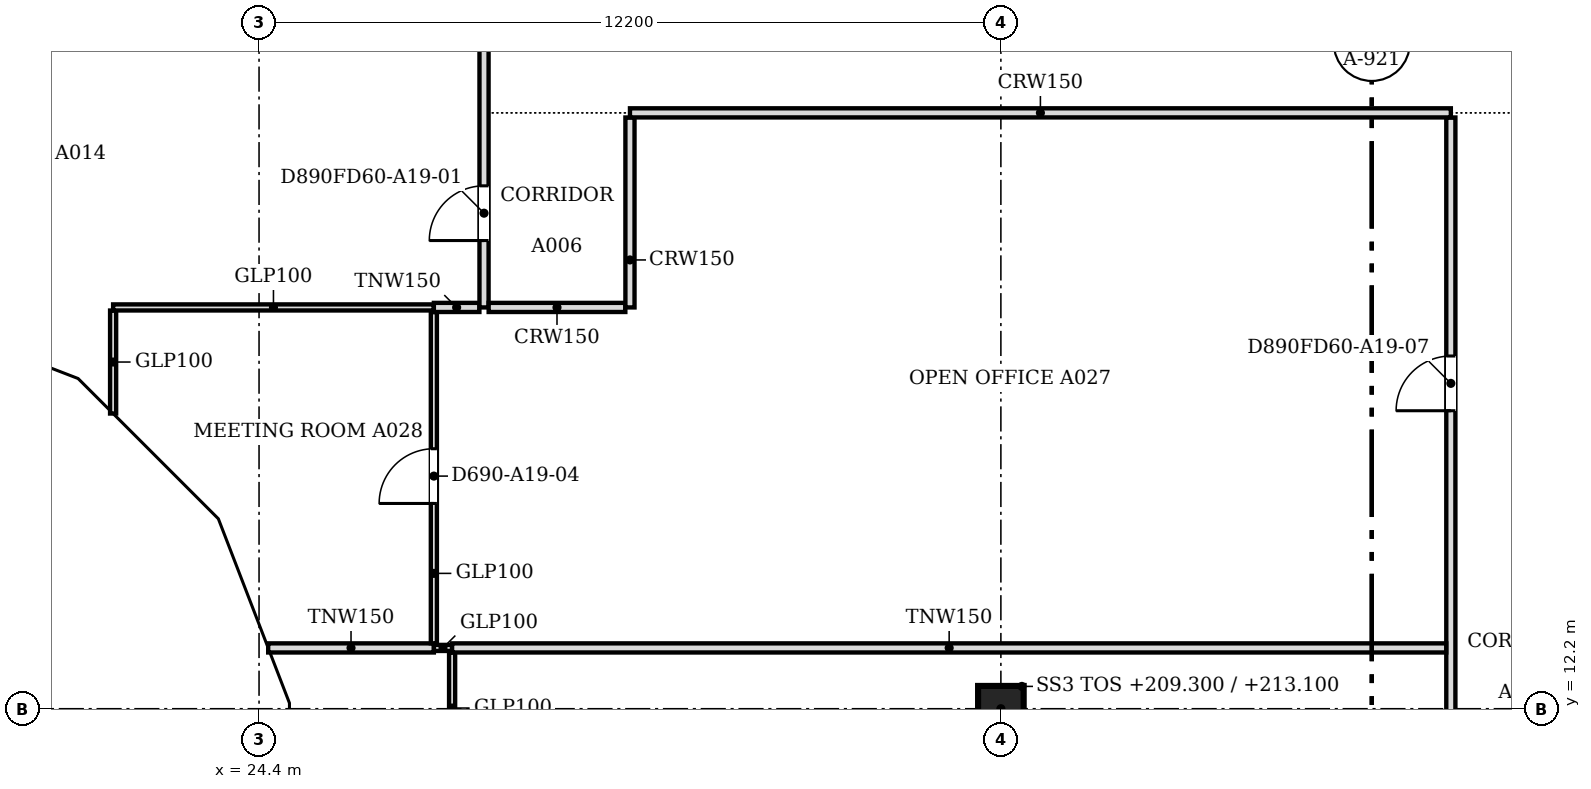
"""IFC4 building model, lengths in metres.
Left out: names, types, materials, properties, quantities, classifications, styles, units other than length and angle.
Written with IfcOpenShell. Run it as: python <this file> out.ifc"""

import sys

from ifc_helpers import new_model, si_unit, direction, frame, frame_2d, origin, origin_2d, place, context, subcontext, project, spatial, polyline, rectangle, outline, extrude, faceted_brep, source, transform, mapped, element, fill, save


model = new_model("IFC4")
c1 = context("Model", 3, precision=1e-05, world=origin(), true_north=direction((0.0, 1.0)))
c2 = subcontext(c1, "Body", "Model", "MODEL_VIEW")
j1 = project(units=[si_unit("LENGTHUNIT", "METRE"), si_unit("PLANEANGLEUNIT", "RADIAN")], contexts=[c1])
p1 = place(None, origin())
s1 = spatial("IfcSite", under=j1, at=p1, CompositionType="ELEMENT")
p2 = place(p1, origin())
s2 = spatial("IfcBuilding", under=s1, at=p2, CompositionType="ELEMENT")
p3 = place(p2, frame((0.0, 0.0, 209.3)))
s3 = spatial("IfcBuildingStorey", under=s2, at=p3, CompositionType="ELEMENT", Elevation=209.3)
p4 = place(p3, frame((36.6, 12.2, 0.0), z_axis=(0.0, 0.0, 1.0), x_axis=(1.0, 0.0, 0.0)))
e1 = element("IfcColumn", 1, at=p4, inside=s3, PredefinedType="COLUMN", context=c2, shape_type="SweptSolid", body=[
    extrude(rectangle(XDim=0.75, YDim=0.75, at=origin_2d()), origin(), (0.0, 0.0, 1.0), 3.6),
])
m1 = source(origin(), c2, "Body", "Brep", [
    faceted_brep([(3.096, -0.25, 7.536), (0.047, -0.25, 3.856), (0.047, -0.25, 3.744), (3.096, -0.25, 0.064), (0.0, 0.25, 3.8), (3.149, 0.25, 7.6), (3.202, 0.25, 7.536), (3.202, 0.25, 0.064), (3.149, 0.25, 0.0), (3.149, -0.0, 0.0), (3.149, -0.0, 7.6), (0.0, 0.0, 3.8)], [[[0, 1, 2, 3]], [[4, 5, 6, 7, 8]], [[8, 7, 9]], [[6, 5, 10]], [[5, 4, 11, 1, 0, 10]], [[4, 8, 9, 3, 2, 11]], [[11, 2, 1]], [[3, 9, 7, 6, 10, 0]]]),
])
p5 = place(p3, frame((18.346, 18.55, -3.8), z_axis=(0.0, 0.0, 1.0), x_axis=(0.932985567668, -0.359913782069, 0.0)))
e2 = element("IfcWall", 2, at=p5, inside=s3, PredefinedType="SOLIDWALL", context=c2, shape_type="MappedRepresentation", body=[
    mapped(m1, transform((0.0, 0.0, 0.0), scale=1.0)),
])
m2 = source(origin(), c2, "Body", "SweptSolid", [
    extrude(outline(polyline([(2.949, 6.967), (0.325, 3.8), (2.949, 0.633), (2.949, 6.967)])), frame((0.0, 0.26, 0.0), z_axis=(0.0, -1.0, 0.0), x_axis=(1.0, 0.0, 0.0)), (0.0, 0.0, 1.0), 0.52),
])
p6 = place(p5, origin())
e3 = element("IfcOpeningElement", 3, at=p6, cuts=e2, PredefinedType="OPENING", context=c2, shape_type="MappedRepresentation", body=[
    mapped(m2, transform((0.0, 0.0, 0.0), scale=1.0)),
])
m3 = source(origin(), c2, "Body", "Brep", [
    faceted_brep([(0.106, -0.25, 0.064), (3.156, -0.25, 3.736), (3.156, -0.25, 3.864), (0.106, -0.25, 7.536), (0.0, 0.25, 7.536), (0.053, 0.25, 7.6), (3.209, 0.25, 3.8), (0.053, 0.25, 0.0), (0.0, 0.25, 0.064), (3.209, -0.0, 3.8), (0.053, 0.0, 0.0), (0.053, 0.0, 7.6)], [[[0, 1, 2, 3]], [[4, 5, 6, 7, 8]], [[7, 6, 9, 1, 0, 10]], [[6, 5, 11, 3, 2, 9]], [[5, 4, 11]], [[8, 7, 10]], [[8, 10, 0, 3, 11, 4]], [[1, 9, 2]]]),
])
p7 = place(p3, frame((21.248, 17.454, -3.8), z_axis=(0.0, 0.0, 1.0), x_axis=(0.707106781187, -0.707106781187, 0.0)))
e4 = element("IfcWall", 4, at=p7, inside=s3, PredefinedType="SOLIDWALL", context=c2, shape_type="MappedRepresentation", body=[
    mapped(m3, transform((0.0, 0.0, 0.0), scale=1.0)),
])
m4 = source(origin(), c2, "Body", "SweptSolid", [
    extrude(outline(polyline([(0.253, 0.632), (2.884, 3.8), (0.253, 6.968), (0.253, 0.632)])), frame((0.0, 0.26, 0.0), z_axis=(0.0, -1.0, 0.0), x_axis=(1.0, 0.0, 0.0)), (0.0, 0.0, 1.0), 0.52),
])
p8 = place(p7, origin())
e5 = element("IfcOpeningElement", 5, at=p8, cuts=e4, PredefinedType="OPENING", context=c2, shape_type="MappedRepresentation", body=[
    mapped(m4, transform((0.0, 0.0, 0.0), scale=1.0)),
])
m5 = source(origin(), c2, "Body", "Brep", [
    faceted_brep([(3.103, -0.25, 7.544), (0.053, -0.25, 3.864), (0.053, -0.25, 3.736), (3.103, -0.25, 0.056), (0.0, 0.25, 3.8), (3.149, 0.25, 7.6), (3.196, 0.25, 7.543), (3.196, 0.25, 0.057), (3.149, 0.25, 0.0), (3.149, -0.0, 0.0), (3.149, -0.0, 7.6), (0.0, 0.0, 3.8)], [[[0, 1, 2, 3]], [[4, 5, 6, 7, 8]], [[8, 7, 9]], [[6, 5, 10]], [[5, 4, 11, 1, 0, 10]], [[4, 8, 9, 3, 2, 11]], [[11, 2, 1]], [[3, 9, 7, 6, 10, 0]]]),
])
p9 = place(p3, frame((23.517, 15.185, -3.8), z_axis=(0.0, 0.0, 1.0), x_axis=(0.359864468756, -0.933004589553, 0.0)))
e6 = element("IfcWall", 6, at=p9, inside=s3, PredefinedType="SOLIDWALL", context=c2, shape_type="MappedRepresentation", body=[
    mapped(m5, transform((0.0, 0.0, 0.0), scale=1.0)),
])
p10 = place(p9, origin())
e7 = element("IfcOpeningElement", 7, at=p10, cuts=e6, PredefinedType="OPENING", context=c2, shape_type="MappedRepresentation", body=[
    mapped(m2, transform((0.0, 0.0, 0.0), scale=1.0)),
])
m6 = source(origin(), c2, "Body", "Brep", [
    faceted_brep([(0.093, -0.25, 0.057), (3.143, -0.25, 3.8), (0.093, -0.25, 7.543), (0.0, 0.25, 7.544), (0.047, 0.25, 7.6), (3.143, 0.25, 3.8), (0.047, 0.25, 0.0), (0.0, 0.25, 0.056), (0.047, 0.0, 0.0), (0.047, 0.0, 7.6)], [[[0, 1, 2]], [[3, 4, 5, 6, 7]], [[6, 5, 1, 0, 8]], [[5, 4, 9, 2, 1]], [[4, 3, 9]], [[7, 6, 8]], [[7, 8, 0, 2, 9, 3]]]),
])
p11 = place(p3, frame((24.65, 12.293, -3.8), z_axis=(0.0, 0.0, 1.0), x_axis=(0.0, -1.0, 0.0)))
e8 = element("IfcWall", 8, at=p11, inside=s3, PredefinedType="SOLIDWALL", context=c2, shape_type="MappedRepresentation", body=[
    mapped(m6, transform((0.0, 0.0, 0.0), scale=1.0)),
])
m7 = source(origin(), c2, "Body", "SweptSolid", [
    extrude(outline(polyline([(0.247, 0.641), (2.821, 3.8), (0.247, 6.959), (0.247, 0.641)])), frame((0.0, 0.26, 0.0), z_axis=(0.0, -1.0, 0.0), x_axis=(1.0, 0.0, 0.0)), (0.0, 0.0, 1.0), 0.52),
])
p12 = place(p11, origin())
e9 = element("IfcOpeningElement", 9, at=p12, cuts=e8, PredefinedType="OPENING", context=c2, shape_type="MappedRepresentation", body=[
    mapped(m7, transform((0.0, 0.0, 0.0), scale=1.0)),
])
p13 = place(p2, frame((0.0, 0.0, 213.1)))
s4 = spatial("IfcBuildingStorey", under=s2, at=p13, CompositionType="ELEMENT", Elevation=213.1)
m8 = source(origin(), c2, "Body", "Brep", [
    faceted_brep([(0.093, -0.25, 0.056), (3.143, -0.25, 3.736), (3.143, -0.25, 3.864), (0.093, -0.25, 7.544), (0.0, 0.25, 7.543), (0.047, 0.25, 7.6), (3.196, 0.25, 3.8), (0.047, 0.25, 0.0), (0.0, 0.25, 0.057), (3.196, -0.0, 3.8), (0.047, 0.0, 0.0), (0.047, 0.0, 7.6)], [[[0, 1, 2, 3]], [[4, 5, 6, 7, 8]], [[7, 6, 9, 1, 0, 10]], [[6, 5, 11, 3, 2, 9]], [[5, 4, 11]], [[8, 7, 10]], [[8, 10, 0, 3, 11, 4]], [[1, 9, 2]]]),
])
p14 = place(p13, frame((18.303, 18.567, -3.8), z_axis=(0.0, 0.0, 1.0), x_axis=(0.932978940178, -0.359930961693, 0.0)))
e10 = element("IfcWall", 10, at=p14, inside=s4, PredefinedType="SOLIDWALL", context=c2, shape_type="MappedRepresentation", body=[
    mapped(m8, transform((0.0, 0.0, 0.0), scale=1.0)),
])
m9 = source(origin(), c2, "Body", "SweptSolid", [
    extrude(outline(polyline([(0.247, 0.633), (2.871, 3.8), (0.247, 6.967), (0.247, 0.633)])), frame((0.0, 0.26, 0.0), z_axis=(0.0, -1.0, 0.0), x_axis=(1.0, 0.0, 0.0)), (0.0, 0.0, 1.0), 0.52),
])
p15 = place(p14, origin())
e11 = element("IfcOpeningElement", 11, at=p15, cuts=e10, PredefinedType="OPENING", context=c2, shape_type="MappedRepresentation", body=[
    mapped(m9, transform((0.0, 0.0, 0.0), scale=1.0)),
])
m10 = source(origin(), c2, "Body", "Brep", [
    faceted_brep([(3.103, -0.25, 7.536), (0.053, -0.25, 3.864), (0.053, -0.25, 3.736), (3.103, -0.25, 0.064), (0.0, 0.25, 3.8), (3.156, 0.25, 7.6), (3.209, 0.25, 7.536), (3.209, 0.25, 0.064), (3.156, 0.25, 0.0), (3.156, -0.0, 0.0), (3.156, -0.0, 7.6), (0.0, 0.0, 3.8)], [[[0, 1, 2, 3]], [[4, 5, 6, 7, 8]], [[8, 7, 9]], [[6, 5, 10]], [[5, 4, 11, 1, 0, 10]], [[4, 8, 9, 3, 2, 11]], [[2, 1, 11]], [[3, 9, 7, 6, 10, 0]]]),
])
p16 = place(p13, frame((21.285, 17.417, -3.8), z_axis=(0.0, 0.0, 1.0), x_axis=(0.707106781187, -0.707106781187, 0.0)))
e12 = element("IfcWall", 12, at=p16, inside=s4, PredefinedType="SOLIDWALL", context=c2, shape_type="MappedRepresentation", body=[
    mapped(m10, transform((0.0, 0.0, 0.0), scale=1.0)),
])
m11 = source(origin(), c2, "Body", "SweptSolid", [
    extrude(outline(polyline([(2.956, 6.968), (0.325, 3.8), (2.956, 0.632), (2.956, 6.968)])), frame((0.0, 0.26, 0.0), z_axis=(0.0, -1.0, 0.0), x_axis=(1.0, 0.0, 0.0)), (0.0, 0.0, 1.0), 0.52),
])
p17 = place(p16, origin())
e13 = element("IfcOpeningElement", 13, at=p17, cuts=e12, PredefinedType="OPENING", context=c2, shape_type="MappedRepresentation", body=[
    mapped(m11, transform((0.0, 0.0, 0.0), scale=1.0)),
])
m12 = source(origin(), c2, "Body", "Brep", [
    faceted_brep([(0.106, -0.25, 0.064), (3.156, -0.25, 3.744), (3.156, -0.25, 3.856), (0.106, -0.25, 7.536), (0.0, 0.25, 7.536), (0.053, 0.25, 7.6), (3.202, 0.25, 3.8), (0.053, 0.25, 0.0), (0.0, 0.25, 0.064), (3.202, -0.0, 3.8), (0.053, 0.0, 0.0), (0.053, 0.0, 7.6)], [[[0, 1, 2, 3]], [[4, 5, 6, 7, 8]], [[7, 6, 9, 1, 0, 10]], [[6, 5, 11, 3, 2, 9]], [[5, 4, 11]], [[8, 7, 10]], [[8, 10, 0, 3, 11, 4]], [[1, 9, 2]]]),
])
p18 = place(p13, frame((23.497, 15.234, -3.8), z_axis=(0.0, 0.0, 1.0), x_axis=(0.359913782069, -0.932985567668, 0.0)))
e14 = element("IfcWall", 14, at=p18, inside=s4, PredefinedType="SOLIDWALL", context=c2, shape_type="MappedRepresentation", body=[
    mapped(m12, transform((0.0, 0.0, 0.0), scale=1.0)),
])
m13 = source(origin(), c2, "Body", "SweptSolid", [
    extrude(outline(polyline([(0.253, 0.633), (2.878, 3.8), (0.253, 6.967), (0.253, 0.633)])), frame((0.0, 0.26, 0.0), z_axis=(0.0, -1.0, 0.0), x_axis=(1.0, 0.0, 0.0)), (0.0, 0.0, 1.0), 0.52),
])
p19 = place(p18, origin())
e15 = element("IfcOpeningElement", 15, at=p19, cuts=e14, PredefinedType="OPENING", context=c2, shape_type="MappedRepresentation", body=[
    mapped(m13, transform((0.0, 0.0, 0.0), scale=1.0)),
])
m14 = source(origin(), c2, "Body", "Brep", [
    faceted_brep([(3.096, -0.25, 0.0), (6.1, -0.25, 3.8), (3.096, -0.25, 7.6), (0.047, -0.25, 3.857), (0.047, -0.25, 3.743), (0.0, 0.25, 3.8), (3.096, 0.25, 7.6), (6.053, 0.25, 3.859), (6.053, 0.25, 3.741), (3.096, 0.25, 0.0), (6.1, -0.0, 3.8), (0.0, 0.0, 3.8)], [[[0, 1, 2, 3, 4]], [[5, 6, 7, 8, 9]], [[9, 8, 10, 1, 0]], [[7, 6, 2, 1, 10]], [[6, 5, 11, 3, 2]], [[5, 9, 0, 4, 11]], [[4, 3, 11]], [[8, 7, 10]]]),
])
p20 = place(p13, frame((24.65, 12.247, -3.8), z_axis=(0.0, 0.0, 1.0), x_axis=(0.0, -1.0, 0.0)))
e16 = element("IfcWall", 16, at=p20, inside=s4, PredefinedType="SOLIDWALL", context=c2, shape_type="MappedRepresentation", body=[
    mapped(m14, transform((0.0, 0.0, 0.0), scale=1.0)),
])
m15 = source(origin(), c2, "Body", "SweptSolid", [
    extrude(outline(polyline([(3.094, 0.399), (5.781, 3.8), (3.094, 7.2), (0.323, 3.8), (3.094, 0.399)])), frame((0.0, 0.26, 0.0), z_axis=(0.0, -1.0, 0.0), x_axis=(1.0, 0.0, 0.0)), (0.0, 0.0, 1.0), 0.52),
])
p21 = place(p20, origin())
e17 = element("IfcOpeningElement", 17, at=p21, cuts=e16, PredefinedType="OPENING", context=c2, shape_type="MappedRepresentation", body=[
    mapped(m15, transform((0.0, 0.0, 0.0), scale=1.0)),
])
p22 = place(p3, frame((44.0, 0.5, 0.0), z_axis=(0.0, 0.0, 1.0), x_axis=(0.0, 1.0, 0.0)))
e18 = element("IfcWall", 18, at=p22, inside=s3, PredefinedType="PARTITIONING", context=c2, shape_type="SweptSolid", body=[
    extrude(rectangle(XDim=21.424, YDim=0.15, at=frame_2d((10.712, 0.0))), origin(), (0.0, 0.0, 1.0), 3.067),
])
m16 = source(origin(), c2, "Body", "SweptSolid", [
    extrude(rectangle(XDim=0.9, YDim=2.1, at=frame_2d((0.45, 1.05))), frame((0.0, 0.085, 0.0), z_axis=(0.0, -1.0, 0.0), x_axis=(1.0, 0.0, 0.0)), (0.0, 0.0, 1.0), 0.17),
])
p23 = place(p22, frame((16.601, 0.0, 0.0)))
e19 = element("IfcOpeningElement", 19, at=p23, cuts=e18, PredefinedType="OPENING", context=c2, shape_type="MappedRepresentation", body=[
    mapped(m16, transform((0.0, 0.0, 0.0), scale=1.0)),
])
p24 = place(p22, frame((7.7, 0.0, 0.0)))
e20 = element("IfcOpeningElement", 20, at=p24, cuts=e18, PredefinedType="OPENING", context=c2, shape_type="MappedRepresentation", body=[
    mapped(m16, transform((0.0, 0.0, 0.0), scale=1.0)),
])
p25 = place(p3, frame((27.575, 8.599, 0.0), z_axis=(0.0, 0.0, 1.0), x_axis=(0.0, 1.0, 0.0)))
e21 = element("IfcWall", 21, at=p25, inside=s3, PredefinedType="PARTITIONING", context=c2, shape_type="SweptSolid", body=[
    extrude(rectangle(XDim=4.525, YDim=0.1, at=frame_2d((2.263, 0.0))), origin(), (0.0, 0.0, 1.0), 3.067),
])
m17 = source(origin(), c2, "Body", "SweptSolid", [
    extrude(rectangle(XDim=0.9, YDim=2.1, at=frame_2d((0.45, 1.05))), frame((0.0, 0.06, 0.0), z_axis=(0.0, -1.0, 0.0), x_axis=(1.0, 0.0, 0.0)), (0.0, 0.0, 1.0), 0.12),
])
p26 = place(p25, frame((1.8, 0.0, 0.0)))
e22 = element("IfcOpeningElement", 22, at=p26, cuts=e21, PredefinedType="OPENING", context=c2, shape_type="MappedRepresentation", body=[
    mapped(m17, transform((0.0, 0.0, 0.0), scale=1.0)),
])
p27 = place(p3, frame((24.55, 13.2, 0.0), z_axis=(0.0, 0.0, 1.0), x_axis=(1.0, 0.0, 0.0)))
e23 = element("IfcWall", 23, at=p27, inside=s3, PredefinedType="PARTITIONING", context=c2, shape_type="SweptSolid", body=[
    extrude(rectangle(XDim=2.725, YDim=0.15, at=frame_2d((1.362, 0.0))), origin(), (0.0, 0.0, 1.0), 3.067),
])
p28 = place(p3, frame((27.276, 13.2, 0.0), z_axis=(0.0, 0.0, 1.0), x_axis=(1.0, 0.0, 0.0)))
e24 = element("IfcWall", 24, at=p28, inside=s3, PredefinedType="PARTITIONING", context=c2, shape_type="SweptSolid", body=[
    extrude(rectangle(XDim=0.298, YDim=0.1, at=frame_2d((0.149, 0.0))), origin(), (0.0, 0.0, 1.0), 3.067),
])
p29 = place(p3, frame((27.575, 13.2, 0.0), z_axis=(0.0, 0.0, 1.0), x_axis=(1.0, 0.0, 0.0)))
e25 = element("IfcWall", 25, at=p29, inside=s3, PredefinedType="PARTITIONING", context=c2, shape_type="SweptSolid", body=[
    extrude(rectangle(XDim=16.349, YDim=0.15, at=frame_2d((8.175, 0.0))), origin(), (0.0, 0.0, 1.0), 3.067),
])
p30 = place(p3, frame((27.275, 13.276, 0.0), z_axis=(0.0, 0.0, 1.0), x_axis=(0.0, 1.0, 0.0)))
e26 = element("IfcWall", 26, at=p30, inside=s3, PredefinedType="PARTITIONING", context=c2, shape_type="SweptSolid", body=[
    extrude(rectangle(XDim=5.448, YDim=0.1, at=frame_2d((2.724, 0.0))), origin(), (0.0, 0.0, 1.0), 3.067),
])
p31 = place(p30, frame((2.3, 0.0, 0.0)))
e27 = element("IfcOpeningElement", 27, at=p31, cuts=e26, PredefinedType="OPENING", context=c2, shape_type="MappedRepresentation", body=[
    mapped(m17, transform((0.0, 0.0, 0.0), scale=1.0)),
])
p32 = place(p3, frame((22.0, 17.055, 0.0), z_axis=(0.0, 0.0, 1.0), x_axis=(0.0, 1.0, 0.0)))
e28 = element("IfcWall", 28, at=p32, inside=s3, PredefinedType="PARTITIONING", context=c2, shape_type="SweptSolid", body=[
    extrude(rectangle(XDim=1.694, YDim=0.1, at=frame_2d((0.847, 0.0))), origin(), (0.0, 0.0, 1.0), 3.067),
])
p33 = place(p3, frame((22.0, 18.8, 0.0), z_axis=(0.0, 0.0, 1.0), x_axis=(1.0, 0.0, 0.0)))
e29 = element("IfcWall", 29, at=p33, inside=s3, PredefinedType="PARTITIONING", context=c2, shape_type="SweptSolid", body=[
    extrude(rectangle(XDim=5.274, YDim=0.1, at=frame_2d((2.637, 0.0))), origin(), (0.0, 0.0, 1.0), 3.067),
])
p34 = place(p3, frame((27.275, 18.8, 0.0), z_axis=(0.0, 0.0, 1.0), x_axis=(1.0, 0.0, 0.0)))
e30 = element("IfcWall", 30, at=p34, inside=s3, PredefinedType="PARTITIONING", context=c2, shape_type="SweptSolid", body=[
    extrude(rectangle(XDim=0.749, YDim=0.15, at=frame_2d((0.375, 0.0))), origin(), (0.0, 0.0, 1.0), 3.067),
])
p35 = place(p3, frame((28.1, 18.8, 0.0), z_axis=(0.0, 0.0, 1.0), x_axis=(0.0, 1.0, 0.0)))
e31 = element("IfcWall", 31, at=p35, inside=s3, PredefinedType="PARTITIONING", context=c2, shape_type="SweptSolid", body=[
    extrude(rectangle(XDim=26.024, YDim=0.15, at=frame_2d((13.012, 0.0))), origin(), (0.0, 0.0, 1.0), 3.067),
])
p36 = place(p35, frame((1.1, 0.0, 0.0)))
e32 = element("IfcOpeningElement", 32, at=p36, cuts=e31, PredefinedType="OPENING", context=c2, shape_type="MappedRepresentation", body=[
    mapped(m16, transform((0.0, 0.0, 0.0), scale=1.0)),
])
m18 = source(origin(), c2, "Body", "SweptSolid", [
    extrude(rectangle(XDim=1.0, YDim=2.1, at=frame_2d((0.5, 1.05))), frame((0.0, 0.085, 0.0), z_axis=(0.0, -1.0, 0.0), x_axis=(1.0, 0.0, 0.0)), (0.0, 0.0, 1.0), 0.17),
])
p37 = place(p35, frame((14.201, 0.0, 0.0)))
e33 = element("IfcOpeningElement", 33, at=p37, cuts=e31, PredefinedType="OPENING", context=c2, shape_type="MappedRepresentation", body=[
    mapped(m18, transform((0.0, 0.0, 0.0), scale=1.0)),
])
p38 = place(p35, frame((8.1, 0.0, 0.0)))
e34 = element("IfcOpeningElement", 34, at=p38, cuts=e31, PredefinedType="OPENING", context=c2, shape_type="MappedRepresentation", body=[
    mapped(m18, transform((0.0, 0.0, 0.0), scale=1.0)),
])
p39 = place(p35, frame((21.5, 0.0, 0.0)))
e35 = element("IfcOpeningElement", 35, at=p39, cuts=e31, PredefinedType="OPENING", context=c2, shape_type="MappedRepresentation", body=[
    mapped(m16, transform((0.0, 0.0, 0.0), scale=1.0)),
])
p40 = place(p3, frame((28.176, 18.8, 0.0), z_axis=(0.0, 0.0, 1.0), x_axis=(1.0, 0.0, 0.0)))
e36 = element("IfcWall", 36, at=p40, inside=s3, PredefinedType="PARTITIONING", context=c2, shape_type="SweptSolid", body=[
    extrude(rectangle(XDim=2.248, YDim=0.15, at=frame_2d((1.124, 0.0))), origin(), (0.0, 0.0, 1.0), 3.067),
])
p41 = place(p3, frame((30.5, 18.8, 0.0), z_axis=(0.0, 0.0, 1.0), x_axis=(0.0, 1.0, 0.0)))
e37 = element("IfcWall", 37, at=p41, inside=s3, PredefinedType="PARTITIONING", context=c2, shape_type="SweptSolid", body=[
    extrude(rectangle(XDim=3.124, YDim=0.15, at=frame_2d((1.562, 0.0))), origin(), (0.0, 0.0, 1.0), 3.067),
])
p42 = place(p3, frame((30.5, 22.0, 0.0), z_axis=(0.0, 0.0, 1.0), x_axis=(1.0, 0.0, 0.0)))
e38 = element("IfcWall", 38, at=p42, inside=s3, PredefinedType="PARTITIONING", context=c2, shape_type="SweptSolid", body=[
    extrude(rectangle(XDim=13.5, YDim=0.15, at=frame_2d((6.75, 0.0))), origin(), (0.0, 0.0, 1.0), 3.067),
])
m19 = source(origin(), c2, "Body", "SweptSolid", [
    extrude(rectangle(XDim=0.9, YDim=2.1, at=frame_2d((0.45, 1.05))), frame((0.0, 0.025, 0.0), z_axis=(0.0, -1.0, 0.0), x_axis=(1.0, 0.0, 0.0)), (0.0, 0.0, 1.0), 0.05),
])
p43 = place(p36, origin())
e39 = element("IfcDoor", 39, at=p43, inside=s3, OperationType="SINGLE_SWING_LEFT", PredefinedType="DOOR", context=c2, shape_type="MappedRepresentation", body=[
    mapped(m19, transform((0.0, 0.0, 0.0), scale=1.0)),
])
fill(e32, e39)
p44 = place(p31, origin())
e40 = element("IfcDoor", 40, at=p44, inside=s3, OperationType="SINGLE_SWING_LEFT", PredefinedType="DOOR", context=c2, shape_type="MappedRepresentation", body=[
    mapped(m19, transform((0.0, 0.0, 0.0), scale=1.0)),
])
fill(e27, e40)
p45 = place(p23, origin())
e41 = element("IfcDoor", 41, at=p45, inside=s3, OperationType="SINGLE_SWING_LEFT", PredefinedType="DOOR", context=c2, shape_type="MappedRepresentation", body=[
    mapped(m19, transform((0.0, 0.0, 0.0), scale=1.0)),
])
fill(e19, e41)
save(model, sys.argv[1])
